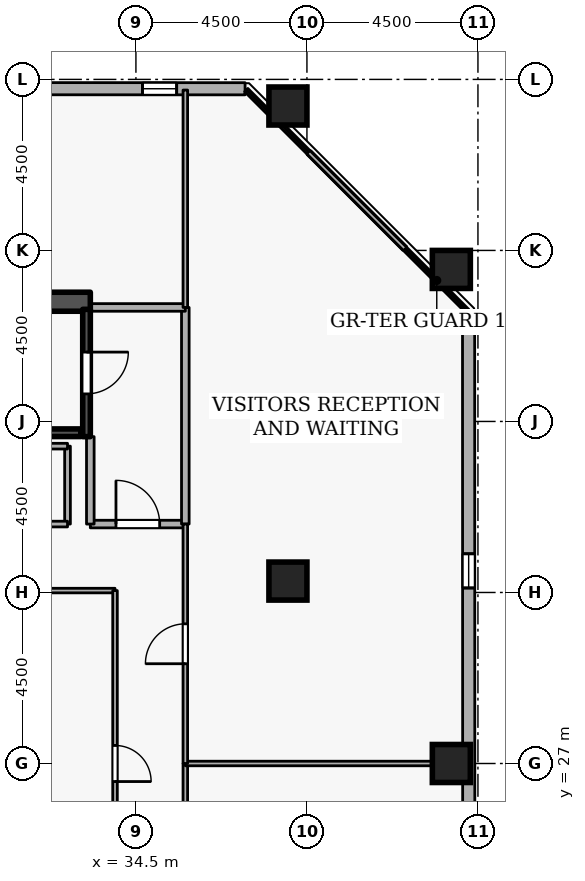
"""IFC4 building model, lengths in metres.
Left out: names, types, materials, properties, quantities, classifications, styles, units other than length and angle.
Written with IfcOpenShell. Run it as: python <this file> out.ifc"""

import sys

from ifc_helpers import new_model, si_unit, direction, frame, frame_2d, origin, origin_2d, place, context, subcontext, project, spatial, rectangle, extrude, element, fill, save


model = new_model("IFC4")
c1 = context("Model", 3, precision=1e-05, world=origin(), true_north=direction((0.0, 1.0)))
c2 = subcontext(c1, "Body", "Model", "MODEL_VIEW")
j1 = project(units=[si_unit("LENGTHUNIT", "METRE"), si_unit("PLANEANGLEUNIT", "RADIAN")], contexts=[c1])
p1 = place(None, origin())
s1 = spatial("IfcSite", under=j1, at=p1, CompositionType="ELEMENT")
p2 = place(p1, origin())
s2 = spatial("IfcBuilding", under=s1, at=p2, CompositionType="ELEMENT")
p3 = place(p2, frame((0.0, 0.0, 233.1)))
s3 = spatial("IfcBuildingStorey", under=s2, at=p3, CompositionType="ELEMENT", Elevation=233.1)
p4 = place(p3, frame((17.7, 39.15, 0.0), z_axis=(0.0, 0.0, 1.0), x_axis=(1.0, 0.0, 0.0)))
e1 = element("IfcWall", 1, at=p4, inside=s3, PredefinedType="SHEAR", context=c2, shape_type="SweptSolid", body=[
    extrude(rectangle(XDim=15.6, YDim=0.5, at=frame_2d((7.8, 0.0))), origin(), (0.0, 0.0, 1.0), 3.6),
])
for number, where, z_axis, x_axis in (
    (2, (42.8, 27.0, 0.0), (0.0, 0.0, 1.0), (1.0, 0.0, 0.0)),
    (3, (42.8, 40.0, 0.0), (0.0, 0.0, 1.0), (1.0, 0.0, 0.0)),
    (4, (38.5, 44.3, 0.0), (0.0, 0.0, 1.0), (1.0, 0.0, 0.0)),
    (5, (38.5, 31.8, 0.0), (0.0, 0.0, 1.0), (1.0, 0.0, 0.0)),
):
    element("IfcColumn", number, at=place(p3, frame(where, z_axis=z_axis, x_axis=x_axis)), inside=s3, PredefinedType="COLUMN", context=c2, shape_type="SweptSolid", body=[
        extrude(rectangle(XDim=1.0, YDim=1.0, at=origin_2d()), origin(), (0.0, 0.0, 1.0), 3.6),
    ])
p5 = place(p3, frame((43.265, 5.819, 0.0), z_axis=(0.0, 0.0, 1.0), x_axis=(-0.000332378036, 0.999999944762, 0.0)))
e6 = element("IfcWall", 6, at=p5, inside=s3, PredefinedType="STANDARD", context=c2, shape_type="SweptSolid", body=[
    extrude(rectangle(XDim=33.054, YDim=0.32, at=frame_2d((16.527, 0.0))), origin(), (0.0, 0.0, 1.0), 2.7),
])
p6 = place(p5, frame((1.8, 0.0, 0.72)))
e7 = element("IfcOpeningElement", 7, at=p6, cuts=e6, PredefinedType="OPENING", context=c2, shape_type="SweptSolid", body=[
    extrude(rectangle(XDim=0.9, YDim=1.75, at=frame_2d((0.45, 0.875))), frame((0.0, 0.17, 0.0), z_axis=(0.0, -1.0, 0.0), x_axis=(1.0, 0.0, 0.0)), (0.0, 0.0, 1.0), 0.34),
])
p7 = place(p5, frame((11.4, 0.0, 0.72)))
e8 = element("IfcOpeningElement", 8, at=p7, cuts=e6, PredefinedType="OPENING", context=c2, shape_type="SweptSolid", body=[
    extrude(rectangle(XDim=0.9, YDim=1.75, at=frame_2d((0.45, 0.875))), frame((0.0, 0.17, 0.0), z_axis=(0.0, -1.0, 0.0), x_axis=(1.0, 0.0, 0.0)), (0.0, 0.0, 1.0), 0.34),
])
p8 = place(p5, frame((16.2, 0.0, 0.72)))
e9 = element("IfcOpeningElement", 9, at=p8, cuts=e6, PredefinedType="OPENING", context=c2, shape_type="SweptSolid", body=[
    extrude(rectangle(XDim=0.9, YDim=1.75, at=frame_2d((0.45, 0.875))), frame((0.0, 0.17, 0.0), z_axis=(0.0, -1.0, 0.0), x_axis=(1.0, 0.0, 0.0)), (0.0, 0.0, 1.0), 0.34),
])
p9 = place(p5, frame((25.8, 0.0, 0.72)))
e10 = element("IfcOpeningElement", 10, at=p9, cuts=e6, PredefinedType="OPENING", context=c2, shape_type="SweptSolid", body=[
    extrude(rectangle(XDim=0.9, YDim=1.75, at=frame_2d((0.45, 0.875))), frame((0.0, 0.17, 0.0), z_axis=(0.0, -1.0, 0.0), x_axis=(1.0, 0.0, 0.0)), (0.0, 0.0, 1.0), 0.34),
])
p10 = place(p3, frame((37.372, 44.754, 0.0), z_axis=(0.0, 0.0, 1.0), x_axis=(-0.999999944762, 0.000332378036, 0.0)))
e11 = element("IfcWall", 11, at=p10, inside=s3, PredefinedType="STANDARD", context=c2, shape_type="SweptSolid", body=[
    extrude(rectangle(XDim=33.054, YDim=0.32, at=frame_2d((16.527, 0.0))), origin(), (0.0, 0.0, 1.0), 2.7),
])
p11 = place(p10, frame((1.8, 0.0, 0.72)))
e12 = element("IfcOpeningElement", 12, at=p11, cuts=e11, PredefinedType="OPENING", context=c2, shape_type="SweptSolid", body=[
    extrude(rectangle(XDim=0.9, YDim=1.75, at=frame_2d((0.45, 0.875))), frame((0.0, 0.17, 0.0), z_axis=(0.0, -1.0, 0.0), x_axis=(1.0, 0.0, 0.0)), (0.0, 0.0, 1.0), 0.34),
])
p12 = place(p10, frame((6.6, 0.0, 0.72)))
e13 = element("IfcOpeningElement", 13, at=p12, cuts=e11, PredefinedType="OPENING", context=c2, shape_type="SweptSolid", body=[
    extrude(rectangle(XDim=0.9, YDim=1.75, at=frame_2d((0.45, 0.875))), frame((0.0, 0.17, 0.0), z_axis=(0.0, -1.0, 0.0), x_axis=(1.0, 0.0, 0.0)), (0.0, 0.0, 1.0), 0.34),
])
p13 = place(p10, frame((16.2, 0.0, 0.72)))
e14 = element("IfcOpeningElement", 14, at=p13, cuts=e11, PredefinedType="OPENING", context=c2, shape_type="SweptSolid", body=[
    extrude(rectangle(XDim=0.9, YDim=1.75, at=frame_2d((0.45, 0.875))), frame((0.0, 0.17, 0.0), z_axis=(0.0, -1.0, 0.0), x_axis=(1.0, 0.0, 0.0)), (0.0, 0.0, 1.0), 0.34),
])
p14 = place(p10, frame((21.0, 0.0, 0.72)))
e15 = element("IfcOpeningElement", 15, at=p14, cuts=e11, PredefinedType="OPENING", context=c2, shape_type="SweptSolid", body=[
    extrude(rectangle(XDim=0.9, YDim=1.75, at=frame_2d((0.45, 0.875))), frame((0.0, 0.17, 0.0), z_axis=(0.0, -1.0, 0.0), x_axis=(1.0, 0.0, 0.0)), (0.0, 0.0, 1.0), 0.34),
])
p15 = place(p3, frame((33.2, 38.95, 0.0), z_axis=(0.0, 0.0, 1.0), x_axis=(0.0, -1.0, 0.0)))
e16 = element("IfcWall", 16, at=p15, inside=s3, PredefinedType="SHEAR", context=c2, shape_type="SweptSolid", body=[
    extrude(rectangle(XDim=3.35, YDim=0.2, at=frame_2d((1.675, 0.0))), origin(), (0.0, 0.0, 1.0), 3.6),
])
p16 = place(p15, frame((1.125, 0.0, 0.0)))
e17 = element("IfcOpeningElement", 17, at=p16, cuts=e16, PredefinedType="OPENING", context=c2, shape_type="SweptSolid", body=[
    extrude(rectangle(XDim=1.1, YDim=2.1, at=frame_2d((0.55, 1.05))), frame((0.0, 0.11, 0.0), z_axis=(0.0, -1.0, 0.0), x_axis=(1.0, 0.0, 0.0)), (0.0, 0.0, 1.0), 0.22),
])
p17 = place(p3, frame((25.95, 35.703, 0.0), z_axis=(0.0, 0.0, 1.0), x_axis=(1.0, 0.0, 0.0)))
e18 = element("IfcWall", 18, at=p17, inside=s3, PredefinedType="SHEAR", context=c2, shape_type="SweptSolid", body=[
    extrude(rectangle(XDim=7.1, YDim=0.2, at=frame_2d((3.55, 0.0))), origin(), (0.0, 0.0, 1.0), 3.6),
])
p18 = place(p3, frame((33.3, 33.3, 0.0), z_axis=(0.0, 0.0, 1.0), x_axis=(1.0, 0.0, 0.0)))
e19 = element("IfcWall", 19, at=p18, inside=s3, PredefinedType="STANDARD", context=c2, shape_type="SweptSolid", body=[
    extrude(rectangle(XDim=2.5, YDim=0.2, at=frame_2d((1.25, 0.0))), origin(), (0.0, 0.0, 1.0), 3.34),
])
p19 = place(p18, frame((0.675, 0.0, 0.0)))
e20 = element("IfcOpeningElement", 20, at=p19, cuts=e19, PredefinedType="OPENING", context=c2, shape_type="SweptSolid", body=[
    extrude(rectangle(XDim=1.15, YDim=2.1, at=frame_2d((0.575, 1.05))), frame((0.0, 0.11, 0.0), z_axis=(0.0, -1.0, 0.0), x_axis=(1.0, 0.0, 0.0)), (0.0, 0.0, 1.0), 0.22),
])
p20 = place(p3, frame((35.8, 33.3, 0.0), z_axis=(0.0, 0.0, 1.0), x_axis=(0.0, 1.0, 0.0)))
e21 = element("IfcWall", 21, at=p20, inside=s3, PredefinedType="STANDARD", context=c2, shape_type="SweptSolid", body=[
    extrude(rectangle(XDim=5.7, YDim=0.2, at=frame_2d((2.85, 0.0))), origin(), (0.0, 0.0, 1.0), 3.34),
])
p21 = place(p3, frame((35.8, 39.0, 0.0), z_axis=(0.0, 0.0, 1.0), x_axis=(-1.0, 0.0, 0.0)))
e22 = element("IfcWall", 22, at=p21, inside=s3, PredefinedType="STANDARD", context=c2, shape_type="SweptSolid", body=[
    extrude(rectangle(XDim=2.5, YDim=0.2, at=frame_2d((1.25, 0.0))), origin(), (0.0, 0.0, 1.0), 3.34),
])
p22 = place(p3, frame((33.3, 35.6, 0.0), z_axis=(0.0, 0.0, 1.0), x_axis=(0.0, -1.0, 0.0)))
e23 = element("IfcWall", 23, at=p22, inside=s3, PredefinedType="STANDARD", context=c2, shape_type="SweptSolid", body=[
    extrude(rectangle(XDim=2.3, YDim=0.2, at=frame_2d((1.15, 0.0))), origin(), (0.0, 0.0, 1.0), 2.545),
])
p23 = place(p3, frame((32.7, 35.35, 0.0), z_axis=(0.0, 0.0, 1.0), x_axis=(0.0, -1.0, 0.0)))
e24 = element("IfcWall", 24, at=p23, inside=s3, PredefinedType="PARTITIONING", context=c2, shape_type="SweptSolid", body=[
    extrude(rectangle(XDim=2.05, YDim=0.15, at=frame_2d((1.025, 0.0))), origin(), (0.0, 0.0, 1.0), 2.545),
])
p24 = place(p3, frame((32.7, 33.3, 0.0), z_axis=(0.0, 0.0, 1.0), x_axis=(-1.0, 0.0, 0.0)))
e25 = element("IfcWall", 25, at=p24, inside=s3, PredefinedType="PARTITIONING", context=c2, shape_type="SweptSolid", body=[
    extrude(rectangle(XDim=2.35, YDim=0.15, at=frame_2d((1.175, 0.0))), origin(), (0.0, 0.0, 1.0), 3.34),
])
p25 = place(p24, frame((0.715, 0.0, 0.0)))
e26 = element("IfcOpeningElement", 26, at=p25, cuts=e25, PredefinedType="OPENING", context=c2, shape_type="SweptSolid", body=[
    extrude(rectangle(XDim=0.92, YDim=2.08, at=frame_2d((0.46, 1.04))), frame((0.0, 0.085, 0.0), z_axis=(0.0, -1.0, 0.0), x_axis=(1.0, 0.0, 0.0)), (0.0, 0.0, 1.0), 0.17),
])
p26 = place(p3, frame((30.35, 35.35, 0.0), z_axis=(0.0, 0.0, 1.0), x_axis=(1.0, 0.0, 0.0)))
e27 = element("IfcWall", 27, at=p26, inside=s3, PredefinedType="PARTITIONING", context=c2, shape_type="SweptSolid", body=[
    extrude(rectangle(XDim=2.35, YDim=0.15, at=frame_2d((1.175, 0.0))), origin(), (0.0, 0.0, 1.0), 3.34),
])
p27 = place(p3, frame((35.8, 14.8, 0.0), z_axis=(0.0, 0.0, 1.0), x_axis=(0.0, 1.0, 0.0)))
e28 = element("IfcWall", 28, at=p27, inside=s3, PredefinedType="PARTITIONING", context=c2, shape_type="SweptSolid", body=[
    extrude(rectangle(XDim=12.2, YDim=0.12, at=frame_2d((6.1, 0.0))), origin(), (0.0, 0.0, 1.0), 3.34),
])
p28 = place(p27, frame((5.575, 0.0, 0.0)))
e29 = element("IfcOpeningElement", 29, at=p28, cuts=e28, PredefinedType="OPENING", context=c2, shape_type="SweptSolid", body=[
    extrude(rectangle(XDim=1.05, YDim=2.1, at=frame_2d((0.525, 1.05))), frame((0.0, 0.07, 0.0), z_axis=(0.0, -1.0, 0.0), x_axis=(1.0, 0.0, 0.0)), (0.0, 0.0, 1.0), 0.14),
])
p29 = place(p3, frame((35.8, 27.0, 0.0), z_axis=(0.0, 0.0, 1.0), x_axis=(1.0, 0.0, 0.0)))
e30 = element("IfcWall", 30, at=p29, inside=s3, PredefinedType="PARTITIONING", context=c2, shape_type="SweptSolid", body=[
    extrude(rectangle(XDim=7.42, YDim=0.12, at=frame_2d((3.71, 0.0))), origin(), (0.0, 0.0, 1.0), 2.932),
])
p30 = place(p3, frame((35.8, 39.0, 0.0), z_axis=(0.0, 0.0, 1.0), x_axis=(0.0, 1.0, 0.0)))
e31 = element("IfcWall", 31, at=p30, inside=s3, PredefinedType="PARTITIONING", context=c2, shape_type="SweptSolid", body=[
    extrude(rectangle(XDim=5.72, YDim=0.12, at=frame_2d((2.86, 0.0))), origin(), (0.0, 0.0, 1.0), 3.34),
])
p31 = place(p3, frame((37.402, 44.72, 0.0), z_axis=(0.0, 0.0, 1.0), x_axis=(0.707106781187, -0.707106781187, 0.0)))
e32 = element("IfcWall", 32, at=p31, inside=s3, PredefinedType="PARTITIONING", context=c2, shape_type="SweptSolid", body=[
    extrude(rectangle(XDim=8.227, YDim=0.12, at=frame_2d((4.114, 0.0))), origin(), (0.0, 0.0, 1.0), 3.34),
])
p32 = place(p3, frame((35.8, 27.0, 0.0), z_axis=(0.0, 0.0, 1.0), x_axis=(0.0, 1.0, 0.0)))
e33 = element("IfcWall", 33, at=p32, inside=s3, PredefinedType="PARTITIONING", context=c2, shape_type="SweptSolid", body=[
    extrude(rectangle(XDim=6.3, YDim=0.12, at=frame_2d((3.15, 0.0))), origin(), (0.0, 0.0, 1.0), 3.34),
])
p33 = place(p32, frame((2.625, 0.0, 0.0)))
e34 = element("IfcOpeningElement", 34, at=p33, cuts=e33, PredefinedType="OPENING", context=c2, shape_type="SweptSolid", body=[
    extrude(rectangle(XDim=1.05, YDim=2.1, at=frame_2d((0.525, 1.05))), frame((0.0, 0.07, 0.0), z_axis=(0.0, -1.0, 0.0), x_axis=(1.0, 0.0, 0.0)), (0.0, 0.0, 1.0), 0.14),
])
p34 = place(p3, frame((30.7, 31.55, 0.0), z_axis=(0.0, 0.0, 1.0), x_axis=(1.0, 0.0, 0.0)))
e35 = element("IfcWall", 35, at=p34, inside=s3, PredefinedType="PARTITIONING", context=c2, shape_type="SweptSolid", body=[
    extrude(rectangle(XDim=3.25, YDim=0.12, at=frame_2d((1.625, 0.0))), origin(), (0.0, 0.0, 1.0), 3.34),
])
p35 = place(p3, frame((33.95, 31.55, 0.0), z_axis=(0.0, 0.0, 1.0), x_axis=(0.0, -1.0, 0.0)))
e36 = element("IfcWall", 36, at=p35, inside=s3, PredefinedType="PARTITIONING", context=c2, shape_type="SweptSolid", body=[
    extrude(rectangle(XDim=9.1, YDim=0.12, at=frame_2d((4.55, 0.0))), origin(), (0.0, 0.0, 1.0), 3.34),
])
p36 = place(p35, frame((4.075, 0.0, 0.0)))
e37 = element("IfcOpeningElement", 37, at=p36, cuts=e36, PredefinedType="OPENING", context=c2, shape_type="SweptSolid", body=[
    extrude(rectangle(XDim=0.95, YDim=2.1, at=frame_2d((0.475, 1.05))), frame((0.0, 0.07, 0.0), z_axis=(0.0, -1.0, 0.0), x_axis=(1.0, 0.0, 0.0)), (0.0, 0.0, 1.0), 0.14),
])
p37 = place(p9, origin())
e38 = element("IfcWindow", 38, at=p37, inside=s3, PartitioningType="SINGLE_PANEL", PredefinedType="WINDOW", context=c2, shape_type="SweptSolid", body=[
    extrude(rectangle(XDim=0.9, YDim=1.75, at=frame_2d((0.45, 0.875))), frame((0.0, 0.03, 0.0), z_axis=(0.0, -1.0, 0.0), x_axis=(1.0, 0.0, 0.0)), (0.0, 0.0, 1.0), 0.06),
])
fill(e10, e38)
p38 = place(p11, origin())
e39 = element("IfcWindow", 39, at=p38, inside=s3, PartitioningType="SINGLE_PANEL", PredefinedType="WINDOW", context=c2, shape_type="SweptSolid", body=[
    extrude(rectangle(XDim=0.9, YDim=1.75, at=frame_2d((0.45, 0.875))), frame((0.0, 0.03, 0.0), z_axis=(0.0, -1.0, 0.0), x_axis=(1.0, 0.0, 0.0)), (0.0, 0.0, 1.0), 0.06),
])
fill(e12, e39)
p39 = place(p16, origin())
e40 = element("IfcDoor", 40, at=p39, inside=s3, OperationType="SINGLE_SWING_LEFT", PredefinedType="DOOR", context=c2, shape_type="SweptSolid", body=[
    extrude(rectangle(XDim=1.1, YDim=2.1, at=frame_2d((0.55, 1.05))), frame((0.0, 0.025, 0.0), z_axis=(0.0, -1.0, 0.0), x_axis=(1.0, 0.0, 0.0)), (0.0, 0.0, 1.0), 0.05),
])
fill(e17, e40)
p40 = place(p19, origin())
e41 = element("IfcDoor", 41, at=p40, inside=s3, OperationType="SINGLE_SWING_LEFT", PredefinedType="DOOR", context=c2, shape_type="SweptSolid", body=[
    extrude(rectangle(XDim=1.15, YDim=2.1, at=frame_2d((0.575, 1.05))), frame((0.0, 0.025, 0.0), z_axis=(0.0, -1.0, 0.0), x_axis=(1.0, 0.0, 0.0)), (0.0, 0.0, 1.0), 0.05),
])
fill(e20, e41)
p41 = place(p33, origin())
e42 = element("IfcDoor", 42, at=p41, inside=s3, OperationType="SINGLE_SWING_LEFT", PredefinedType="DOOR", context=c2, shape_type="SweptSolid", body=[
    extrude(rectangle(XDim=1.05, YDim=2.1, at=frame_2d((0.525, 1.05))), frame((0.0, 0.025, 0.0), z_axis=(0.0, -1.0, 0.0), x_axis=(1.0, 0.0, 0.0)), (0.0, 0.0, 1.0), 0.05),
])
fill(e34, e42)
p42 = place(p36, origin())
e43 = element("IfcDoor", 43, at=p42, inside=s3, OperationType="SINGLE_SWING_RIGHT", PredefinedType="DOOR", context=c2, shape_type="SweptSolid", body=[
    extrude(rectangle(XDim=0.95, YDim=2.1, at=frame_2d((0.475, 1.05))), frame((0.0, 0.025, 0.0), z_axis=(0.0, -1.0, 0.0), x_axis=(1.0, 0.0, 0.0)), (0.0, 0.0, 1.0), 0.05),
])
fill(e37, e43)
save(model, sys.argv[1])
